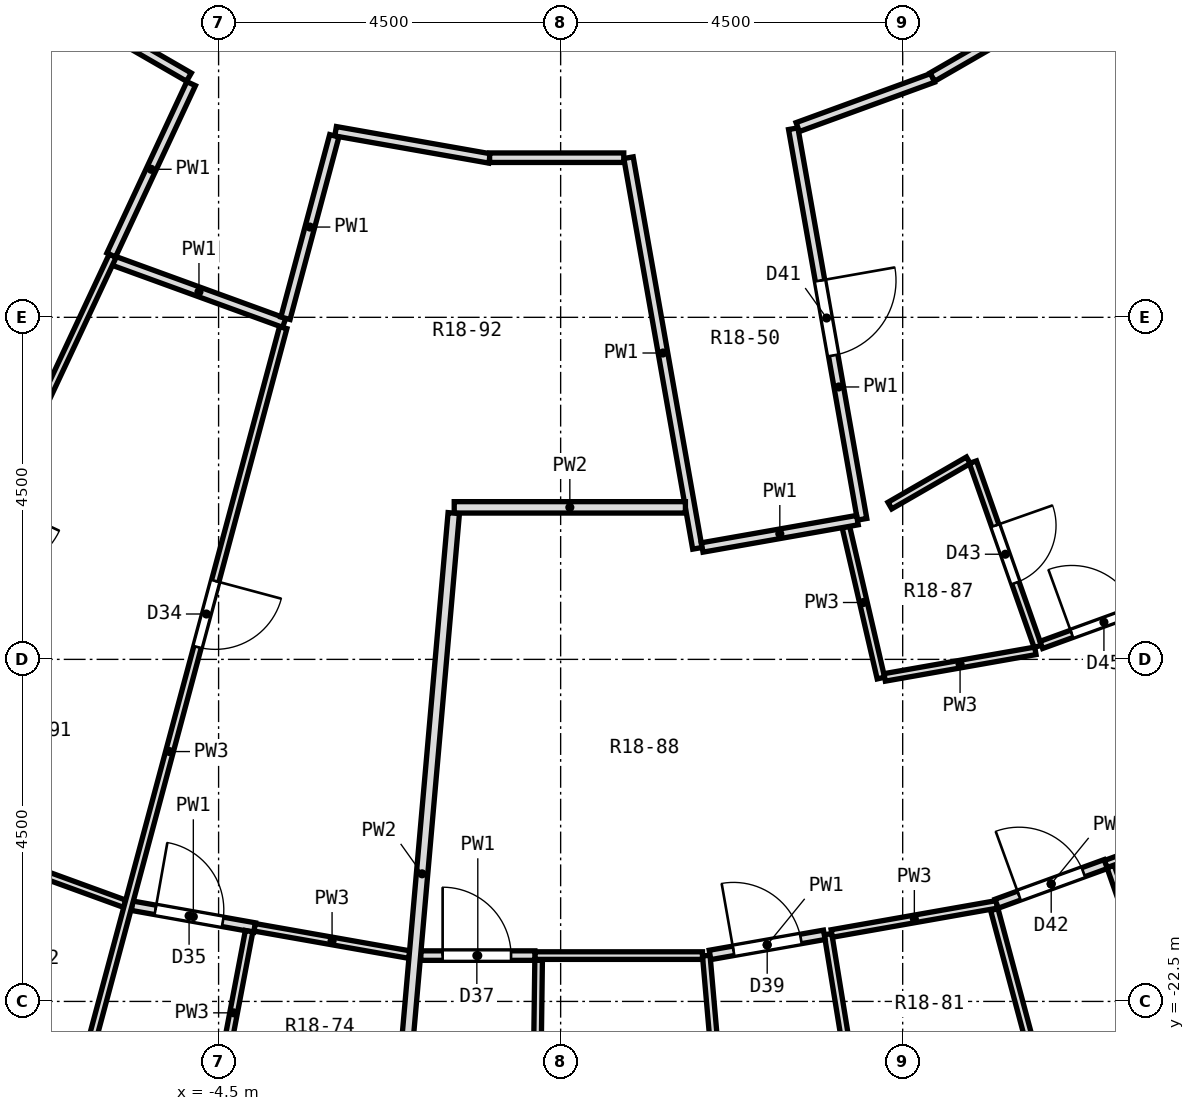
"""IFC4 building model, lengths in metres.
Left out: names, types, materials, properties, quantities, classifications, styles, units other than length and angle.
Written with IfcOpenShell. Run it as: python <this file> out.ifc"""

import sys

from ifc_helpers import new_model, si_unit, direction, frame, frame_2d, origin, place, context, subcontext, project, spatial, rectangle, extrude, element, fill, save


model = new_model("IFC4")
c1 = context("Model", 3, precision=1e-05, world=origin(), true_north=direction((0.0, 1.0)))
c2 = subcontext(c1, "Body", "Model", "MODEL_VIEW")
j1 = project(units=[si_unit("LENGTHUNIT", "METRE"), si_unit("PLANEANGLEUNIT", "RADIAN")], contexts=[c1])
p1 = place(None, origin())
s1 = spatial("IfcSite", under=j1, at=p1, CompositionType="ELEMENT")
p2 = place(p1, origin())
s2 = spatial("IfcBuilding", under=s1, at=p2, CompositionType="ELEMENT")
p3 = place(p2, frame((0.0, 0.0, 101.8)))
s3 = spatial("IfcBuildingStorey", under=s2, at=p3, CompositionType="ELEMENT", Elevation=101.8)
p4 = place(p3, frame((1.916, -21.897, 0.0), z_axis=(0.0, 0.0, 1.0), x_axis=(0.087069954148, -0.996202199899, 0.0)))
e1 = element("IfcWall", 1, at=p4, inside=s3, PredefinedType="PARTITIONING", context=c2, shape_type="SweptSolid", body=[
    extrude(rectangle(XDim=3.684, YDim=0.1, at=frame_2d((1.842, 0.0))), origin(), (0.0, 0.0, 1.0), 2.8),
])
p5 = place(p3, frame((3.518, -21.615, 0.0), z_axis=(0.0, 0.0, 1.0), x_axis=(0.160403826344, -0.987051474085, 0.0)))
e2 = element("IfcWall", 2, at=p5, inside=s3, PredefinedType="PARTITIONING", context=c2, shape_type="SweptSolid", body=[
    extrude(rectangle(XDim=2.3, YDim=0.1, at=frame_2d((1.15, 0.0))), origin(), (0.0, 0.0, 1.0), 2.8),
])
p6 = place(p3, frame((0.893, -11.4, 0.0), z_axis=(0.0, 0.0, 1.0), x_axis=(0.173617189854, -0.984813216497, 0.0)))
e3 = element("IfcWall", 3, at=p6, inside=s3, PredefinedType="PARTITIONING", context=c2, shape_type="SweptSolid", body=[
    extrude(rectangle(XDim=5.219, YDim=0.125, at=frame_2d((2.609, 0.0))), origin(), (0.0, 0.0, 1.0), 2.8),
])
p7 = place(p3, frame((3.06, -11.019, 0.0), z_axis=(0.0, 0.0, 1.0), x_axis=(0.173641190819, -0.984808984956, 0.0)))
e4 = element("IfcWall", 4, at=p7, inside=s3, PredefinedType="PARTITIONING", context=c2, shape_type="SweptSolid", body=[
    extrude(rectangle(XDim=5.218, YDim=0.125, at=frame_2d((2.609, 0.0))), origin(), (0.0, 0.0, 1.0), 2.8),
])
p8 = place(p7, frame((2.029, 0.0, 0.0)))
e5 = element("IfcOpeningElement", 5, at=p8, cuts=e4, PredefinedType="OPENING", context=c2, shape_type="SweptSolid", body=[
    extrude(rectangle(XDim=1.0, YDim=2.1, at=frame_2d((0.5, 1.05))), frame((0.0, 0.074, 0.0), z_axis=(0.0, -1.0, 0.0), x_axis=(1.0, 0.0, 0.0)), (0.0, 0.0, 1.0), 0.149),
])
p9 = place(p3, frame((3.753, -16.258, 0.0), z_axis=(0.0, 0.0, 1.0), x_axis=(0.22577693712, -0.974179025983, 0.0)))
e6 = element("IfcWall", 6, at=p9, inside=s3, PredefinedType="PARTITIONING", context=c2, shape_type="SweptSolid", body=[
    extrude(rectangle(XDim=2.041, YDim=0.1, at=frame_2d((1.02, 0.0))), origin(), (0.0, 0.0, 1.0), 2.8),
])
p10 = place(p3, frame((5.706, -21.292, 0.0), z_axis=(0.0, 0.0, 1.0), x_axis=(0.258396854417, -0.966038853063, 0.0)))
e7 = element("IfcWall", 7, at=p10, inside=s3, PredefinedType="PARTITIONING", context=c2, shape_type="SweptSolid", body=[
    extrude(rectangle(XDim=3.622, YDim=0.1, at=frame_2d((1.811, 0.0))), origin(), (0.0, 0.0, 1.0), 2.8),
])
p11 = place(p3, frame((7.234, -20.723, 0.0), z_axis=(0.0, 0.0, 1.0), x_axis=(0.329707399535, -0.944083169372, 0.0)))
e8 = element("IfcWall", 8, at=p11, inside=s3, PredefinedType="PARTITIONING", context=c2, shape_type="SweptSolid", body=[
    extrude(rectangle(XDim=2.25, YDim=0.1, at=frame_2d((1.125, 0.0))), origin(), (0.0, 0.0, 1.0), 2.8),
])
p12 = place(p3, frame((5.424, -15.405, 0.0), z_axis=(0.0, 0.0, 1.0), x_axis=(0.332059637914, -0.943258393479, 0.0)))
e9 = element("IfcWall", 9, at=p12, inside=s3, PredefinedType="PARTITIONING", context=c2, shape_type="SweptSolid", body=[
    extrude(rectangle(XDim=2.57, YDim=0.1, at=frame_2d((1.285, 0.0))), origin(), (0.0, 0.0, 1.0), 2.8),
])
p13 = place(p12, frame((0.885, 0.0, 0.0)))
e10 = element("IfcOpeningElement", 10, at=p13, cuts=e9, PredefinedType="OPENING", context=c2, shape_type="SweptSolid", body=[
    extrude(rectangle(XDim=0.8, YDim=2.1, at=frame_2d((0.4, 1.05))), frame((0.0, 0.062, 0.0), z_axis=(0.0, -1.0, 0.0), x_axis=(1.0, 0.0, 0.0)), (0.0, 0.0, 1.0), 0.124),
])
p14 = place(p3, frame((-6.421, -9.456, 0.0), z_axis=(0.0, 0.0, 1.0), x_axis=(0.866118896865, -0.499838030259, 0.0)))
e11 = element("IfcWall", 11, at=p14, inside=s3, PredefinedType="PARTITIONING", context=c2, shape_type="SweptSolid", body=[
    extrude(rectangle(XDim=1.768, YDim=0.125, at=frame_2d((0.884, 0.0))), origin(), (0.0, 0.0, 1.0), 2.8),
])
p15 = place(p3, frame((-8.576, -22.629, 0.0), z_axis=(0.0, 0.0, 1.0), x_axis=(0.939703758344, -0.341989541586, 0.0)))
e12 = element("IfcWall", 12, at=p15, inside=s3, PredefinedType="PARTITIONING", context=c2, shape_type="SweptSolid", body=[
    extrude(rectangle(XDim=2.386, YDim=0.1, at=frame_2d((1.193, 0.0))), origin(), (0.0, 0.0, 1.0), 2.8),
])
p16 = place(p15, frame((0.818, 0.0, 0.0)))
e13 = element("IfcOpeningElement", 13, at=p16, cuts=e12, PredefinedType="OPENING", context=c2, shape_type="SweptSolid", body=[
    extrude(rectangle(XDim=0.8, YDim=2.1, at=frame_2d((0.4, 1.05))), frame((0.0, 0.062, 0.0), z_axis=(0.0, -1.0, 0.0), x_axis=(1.0, 0.0, 0.0)), (0.0, 0.0, 1.0), 0.124),
])
p17 = place(p3, frame((-7.808, -20.461, 0.0), z_axis=(0.0, 0.0, 1.0), x_axis=(0.939728749343, -0.341920864613, 0.0)))
e14 = element("IfcWall", 14, at=p17, inside=s3, PredefinedType="PARTITIONING", context=c2, shape_type="SweptSolid", body=[
    extrude(rectangle(XDim=2.205, YDim=0.1, at=frame_2d((1.103, 0.0))), origin(), (0.0, 0.0, 1.0), 2.8),
])
p18 = place(p3, frame((-5.879, -12.756, 0.0), z_axis=(0.0, 0.0, 1.0), x_axis=(0.939637973706, -0.342170247639, 0.0)))
e15 = element("IfcWall", 15, at=p18, inside=s3, PredefinedType="PARTITIONING", context=c2, shape_type="SweptSolid", body=[
    extrude(rectangle(XDim=2.386, YDim=0.125, at=frame_2d((1.193, 0.0))), origin(), (0.0, 0.0, 1.0), 2.8),
])
p19 = place(p3, frame((-5.64, -21.241, 0.0), z_axis=(0.0, 0.0, 1.0), x_axis=(0.984569921273, -0.174991628724, 0.0)))
e16 = element("IfcWall", 16, at=p19, inside=s3, PredefinedType="PARTITIONING", context=c2, shape_type="SweptSolid", body=[
    extrude(rectangle(XDim=1.639, YDim=0.125, at=frame_2d((0.82, 0.0))), origin(), (0.0, 0.0, 1.0), 2.8),
])
p20 = place(p19, frame((0.313, 0.0, 0.0)))
e17 = element("IfcOpeningElement", 17, at=p20, cuts=e16, PredefinedType="OPENING", context=c2, shape_type="SweptSolid", body=[
    extrude(rectangle(XDim=0.9, YDim=2.1, at=frame_2d((0.45, 1.05))), frame((0.0, 0.074, 0.0), z_axis=(0.0, -1.0, 0.0), x_axis=(1.0, 0.0, 0.0)), (0.0, 0.0, 1.0), 0.149),
])
p21 = place(p3, frame((-4.025, -21.525, 0.0), z_axis=(0.0, 0.0, 1.0), x_axis=(0.984791880798, -0.173738169424, 0.0)))
e18 = element("IfcWall", 18, at=p21, inside=s3, PredefinedType="PARTITIONING", context=c2, shape_type="SweptSolid", body=[
    extrude(rectangle(XDim=2.067, YDim=0.1, at=frame_2d((1.034, 0.0))), origin(), (0.0, 0.0, 1.0), 2.8),
])
p22 = place(p3, frame((-2.961, -11.052, 0.0), z_axis=(0.0, 0.0, 1.0), x_axis=(0.984777586027, -0.173819176329, 0.0)))
e19 = element("IfcWall", 19, at=p22, inside=s3, PredefinedType="PARTITIONING", context=c2, shape_type="SweptSolid", body=[
    extrude(rectangle(XDim=2.058, YDim=0.125, at=frame_2d((1.029, 0.0))), origin(), (0.0, 0.0, 1.0), 2.8),
])
p23 = place(p3, frame((-0.339, -21.897, 0.0), z_axis=(0.0, 0.0, 1.0), x_axis=(1.0, 0.0, 0.0)))
e20 = element("IfcWall", 20, at=p23, inside=s3, PredefinedType="PARTITIONING", context=c2, shape_type="SweptSolid", body=[
    extrude(rectangle(XDim=2.205, YDim=0.1, at=frame_2d((1.103, 0.0))), origin(), (0.0, 0.0, 1.0), 2.8),
])
p24 = place(p3, frame((-1.841, -21.897, 0.0), z_axis=(0.0, 0.0, 1.0), x_axis=(1.0, 0.0, 0.0)))
e21 = element("IfcWall", 21, at=p24, inside=s3, PredefinedType="PARTITIONING", context=c2, shape_type="SweptSolid", body=[
    extrude(rectangle(XDim=1.502, YDim=0.125, at=frame_2d((0.751, 0.0))), origin(), (0.0, 0.0, 1.0), 2.8),
])
p25 = place(p24, frame((0.289, 0.0, 0.0)))
e22 = element("IfcOpeningElement", 22, at=p25, cuts=e21, PredefinedType="OPENING", context=c2, shape_type="SweptSolid", body=[
    extrude(rectangle(XDim=0.9, YDim=2.1, at=frame_2d((0.45, 1.05))), frame((0.0, 0.074, 0.0), z_axis=(0.0, -1.0, 0.0), x_axis=(1.0, 0.0, 0.0)), (0.0, 0.0, 1.0), 0.149),
])
p26 = place(p3, frame((-1.4, -16.0, 0.0), z_axis=(0.0, 0.0, 1.0), x_axis=(1.0, 0.0, 0.0)))
e23 = element("IfcWall", 23, at=p26, inside=s3, PredefinedType="PARTITIONING", context=c2, shape_type="SweptSolid", body=[
    extrude(rectangle(XDim=3.042, YDim=0.15, at=frame_2d((1.521, 0.0))), origin(), (0.0, 0.0, 1.0), 2.8),
])
p27 = place(p3, frame((-0.935, -11.4, 0.0), z_axis=(0.0, 0.0, 1.0), x_axis=(1.0, 0.0, 0.0)))
e24 = element("IfcWall", 24, at=p27, inside=s3, PredefinedType="PARTITIONING", context=c2, shape_type="SweptSolid", body=[
    extrude(rectangle(XDim=1.765, YDim=0.125, at=frame_2d((0.883, 0.0))), origin(), (0.0, 0.0, 1.0), 2.8),
])
p28 = place(p3, frame((3.567, -21.606, 0.0), z_axis=(0.0, 0.0, 1.0), x_axis=(0.984800270927, 0.173690605338, 0.0)))
e25 = element("IfcWall", 25, at=p28, inside=s3, PredefinedType="PARTITIONING", context=c2, shape_type="SweptSolid", body=[
    extrude(rectangle(XDim=2.205, YDim=0.1, at=frame_2d((1.103, 0.0))), origin(), (0.0, 0.0, 1.0), 2.8),
])
p29 = place(p3, frame((1.965, -21.888, 0.0), z_axis=(0.0, 0.0, 1.0), x_axis=(0.984857531579, 0.173365632386, 0.0)))
e26 = element("IfcWall", 26, at=p29, inside=s3, PredefinedType="PARTITIONING", context=c2, shape_type="SweptSolid", body=[
    extrude(rectangle(XDim=1.527, YDim=0.125, at=frame_2d((0.763, 0.0))), origin(), (0.0, 0.0, 1.0), 2.8),
])
p30 = place(p29, frame((0.314, 0.0, 0.0)))
e27 = element("IfcOpeningElement", 27, at=p30, cuts=e26, PredefinedType="OPENING", context=c2, shape_type="SweptSolid", body=[
    extrude(rectangle(XDim=0.9, YDim=2.1, at=frame_2d((0.45, 1.05))), frame((0.0, 0.074, 0.0), z_axis=(0.0, -1.0, 0.0), x_axis=(1.0, 0.0, 0.0)), (0.0, 0.0, 1.0), 0.149),
])
p31 = place(p3, frame((4.263, -18.237, 0.0), z_axis=(0.0, 0.0, 1.0), x_axis=(0.984827477251, 0.173536278777, 0.0)))
e28 = element("IfcWall", 28, at=p31, inside=s3, PredefinedType="PARTITIONING", context=c2, shape_type="SweptSolid", body=[
    extrude(rectangle(XDim=2.013, YDim=0.1, at=frame_2d((1.007, 0.0))), origin(), (0.0, 0.0, 1.0), 2.8),
])
p32 = place(p3, frame((1.862, -16.528, 0.0), z_axis=(0.0, 0.0, 1.0), x_axis=(0.984827380623, 0.173536827142, 0.0)))
e29 = element("IfcWall", 29, at=p32, inside=s3, PredefinedType="PARTITIONING", context=c2, shape_type="SweptSolid", body=[
    extrude(rectangle(XDim=2.074, YDim=0.125, at=frame_2d((1.037, 0.0))), origin(), (0.0, 0.0, 1.0), 2.8),
])
p33 = place(p3, frame((7.171, -20.693, 0.0), z_axis=(0.0, 0.0, 1.0), x_axis=(0.939573404597, 0.342347509665, 0.0)))
e30 = element("IfcWall", 30, at=p33, inside=s3, PredefinedType="PARTITIONING", context=c2, shape_type="SweptSolid", body=[
    extrude(rectangle(XDim=2.205, YDim=0.1, at=frame_2d((1.103, 0.0))), origin(), (0.0, 0.0, 1.0), 2.8),
])
p34 = place(p3, frame((5.736, -21.215, 0.0), z_axis=(0.0, 0.0, 1.0), x_axis=(0.939798092341, 0.34173022347, 0.0)))
e31 = element("IfcWall", 31, at=p34, inside=s3, PredefinedType="PARTITIONING", context=c2, shape_type="SweptSolid", body=[
    extrude(rectangle(XDim=1.527, YDim=0.125, at=frame_2d((0.763, 0.0))), origin(), (0.0, 0.0, 1.0), 2.8),
])
p35 = place(p34, frame((0.314, 0.0, 0.0)))
e32 = element("IfcOpeningElement", 32, at=p35, cuts=e31, PredefinedType="OPENING", context=c2, shape_type="SweptSolid", body=[
    extrude(rectangle(XDim=0.9, YDim=2.1, at=frame_2d((0.45, 1.05))), frame((0.0, 0.074, 0.0), z_axis=(0.0, -1.0, 0.0), x_axis=(1.0, 0.0, 0.0)), (0.0, 0.0, 1.0), 0.149),
])
p36 = place(p3, frame((6.324, -17.81, 0.0), z_axis=(0.0, 0.0, 1.0), x_axis=(0.939842226204, 0.341608825771, 0.0)))
e33 = element("IfcWall", 33, at=p36, inside=s3, PredefinedType="PARTITIONING", context=c2, shape_type="SweptSolid", body=[
    extrude(rectangle(XDim=1.752, YDim=0.1, at=frame_2d((0.876, 0.0))), origin(), (0.0, 0.0, 1.0), 2.8),
])
p37 = place(p36, frame((0.426, 0.0, 0.0)))
e34 = element("IfcOpeningElement", 34, at=p37, cuts=e33, PredefinedType="OPENING", context=c2, shape_type="SweptSolid", body=[
    extrude(rectangle(XDim=0.9, YDim=2.1, at=frame_2d((0.45, 1.05))), frame((0.0, 0.062, 0.0), z_axis=(0.0, -1.0, 0.0), x_axis=(1.0, 0.0, 0.0)), (0.0, 0.0, 1.0), 0.124),
])
p38 = place(p3, frame((3.119, -10.997, 0.0), z_axis=(0.0, 0.0, 1.0), x_axis=(0.939510386217, 0.342520414269, 0.0)))
e35 = element("IfcWall", 35, at=p38, inside=s3, PredefinedType="PARTITIONING", context=c2, shape_type="SweptSolid", body=[
    extrude(rectangle(XDim=1.891, YDim=0.125, at=frame_2d((0.946, 0.0))), origin(), (0.0, 0.0, 1.0), 2.8),
])
p39 = place(p3, frame((4.331, -15.977, 0.0), z_axis=(0.0, 0.0, 1.0), x_axis=(0.86607987314, 0.499905644439, 0.0)))
e36 = element("IfcWall", 36, at=p39, inside=s3, PredefinedType="PARTITIONING", context=c2, shape_type="SweptSolid", body=[
    extrude(rectangle(XDim=1.192, YDim=0.1, at=frame_2d((0.596, 0.0))), origin(), (0.0, 0.0, 1.0), 2.8),
])
p40 = place(p3, frame((4.89, -10.34, 0.0), z_axis=(0.0, 0.0, 1.0), x_axis=(0.866142818645, 0.499796576329, 0.0)))
e37 = element("IfcWall", 37, at=p40, inside=s3, PredefinedType="PARTITIONING", context=c2, shape_type="SweptSolid", body=[
    extrude(rectangle(XDim=1.996, YDim=0.125, at=frame_2d((0.998, 0.0))), origin(), (0.0, 0.0, 1.0), 2.8),
])
p41 = place(p3, frame((-9.788, -13.375, 0.0), z_axis=(0.0, 0.0, 1.0), x_axis=(0.643234807085, 0.765668977401, 0.0)))
e38 = element("IfcWall", 38, at=p41, inside=s3, PredefinedType="PARTITIONING", context=c2, shape_type="SweptSolid", body=[
    extrude(rectangle(XDim=5.093, YDim=0.125, at=frame_2d((2.546, 0.0))), origin(), (0.0, 0.0, 1.0), 2.8),
])
p42 = place(p41, frame((2.32, 0.0, 0.0)))
e39 = element("IfcOpeningElement", 39, at=p42, cuts=e38, PredefinedType="OPENING", context=c2, shape_type="SweptSolid", body=[
    extrude(rectangle(XDim=1.0, YDim=2.1, at=frame_2d((0.5, 1.05))), frame((0.0, 0.074, 0.0), z_axis=(0.0, -1.0, 0.0), x_axis=(1.0, 0.0, 0.0)), (0.0, 0.0, 1.0), 0.149),
])
p43 = place(p3, frame((-10.845, -23.261, 0.0), z_axis=(0.0, 0.0, 1.0), x_axis=(0.424206154739, 0.905565645484, 0.0)))
e40 = element("IfcWall", 40, at=p43, inside=s3, PredefinedType="PARTITIONING", context=c2, shape_type="SweptSolid", body=[
    extrude(rectangle(XDim=11.675, YDim=0.1, at=frame_2d((5.837, 0.0))), origin(), (0.0, 0.0, 1.0), 2.8),
])
p44 = place(p43, frame((7.199, 0.0, 0.0)))
e41 = element("IfcOpeningElement", 41, at=p44, cuts=e40, PredefinedType="OPENING", context=c2, shape_type="SweptSolid", body=[
    extrude(rectangle(XDim=0.9, YDim=2.1, at=frame_2d((0.45, 1.05))), frame((0.0, 0.062, 0.0), z_axis=(0.0, -1.0, 0.0), x_axis=(1.0, 0.0, 0.0)), (0.0, 0.0, 1.0), 0.124),
])
p45 = place(p3, frame((-5.913, -12.68, 0.0), z_axis=(0.0, 0.0, 1.0), x_axis=(0.422627539676, 0.906303460606, 0.0)))
e42 = element("IfcWall", 42, at=p45, inside=s3, PredefinedType="PARTITIONING", context=c2, shape_type="SweptSolid", body=[
    extrude(rectangle(XDim=2.488, YDim=0.125, at=frame_2d((1.244, 0.0))), origin(), (0.0, 0.0, 1.0), 2.8),
])
p46 = place(p3, frame((-6.642, -24.791, 0.0), z_axis=(0.0, 0.0, 1.0), x_axis=(0.259103074619, 0.965849676049, 0.0)))
e43 = element("IfcWall", 43, at=p46, inside=s3, PredefinedType="PARTITIONING", context=c2, shape_type="SweptSolid", body=[
    extrude(rectangle(XDim=11.549, YDim=0.1, at=frame_2d((5.774, 0.0))), origin(), (0.0, 0.0, 1.0), 2.8),
])
p47 = place(p46, frame((7.199, 0.0, 0.0)))
e44 = element("IfcOpeningElement", 44, at=p47, cuts=e43, PredefinedType="OPENING", context=c2, shape_type="SweptSolid", body=[
    extrude(rectangle(XDim=0.9, YDim=2.1, at=frame_2d((0.45, 1.05))), frame((0.0, 0.062, 0.0), z_axis=(0.0, -1.0, 0.0), x_axis=(1.0, 0.0, 0.0)), (0.0, 0.0, 1.0), 0.124),
])
p48 = place(p3, frame((-3.62, -13.512, 0.0), z_axis=(0.0, 0.0, 1.0), x_axis=(0.258641119931, 0.965973483632, 0.0)))
e45 = element("IfcWall", 45, at=p48, inside=s3, PredefinedType="PARTITIONING", context=c2, shape_type="SweptSolid", body=[
    extrude(rectangle(XDim=2.484, YDim=0.125, at=frame_2d((1.242, 0.0))), origin(), (0.0, 0.0, 1.0), 2.8),
])
p49 = place(p3, frame((-4.507, -23.725, 0.0), z_axis=(0.0, 0.0, 1.0), x_axis=(0.186471082638, 0.982460449759, 0.0)))
e46 = element("IfcWall", 46, at=p49, inside=s3, PredefinedType="PARTITIONING", context=c2, shape_type="SweptSolid", body=[
    extrude(rectangle(XDim=2.188, YDim=0.1, at=frame_2d((1.094, 0.0))), origin(), (0.0, 0.0, 1.0), 2.8),
])
p50 = place(p3, frame((-2.24, -25.567, 0.0), z_axis=(0.0, 0.0, 1.0), x_axis=(0.087555048891, 0.996159682688, 0.0)))
e47 = element("IfcWall", 47, at=p50, inside=s3, PredefinedType="PARTITIONING", context=c2, shape_type="SweptSolid", body=[
    extrude(rectangle(XDim=9.528, YDim=0.15, at=frame_2d((4.764, 0.0))), origin(), (0.0, 0.0, 1.0), 2.8),
])
p51 = place(p3, frame((-0.318, -24.147, 0.0), z_axis=(0.0, 0.0, 1.0), x_axis=(0.013056922579, 0.999914754753, 0.0)))
e48 = element("IfcWall", 48, at=p51, inside=s3, PredefinedType="PARTITIONING", context=c2, shape_type="SweptSolid", body=[
    extrude(rectangle(XDim=2.188, YDim=0.1, at=frame_2d((1.094, 0.0))), origin(), (0.0, 0.0, 1.0), 2.8),
])
p52 = place(p47, frame((0.9, 0.0, 0.0), z_axis=(0.0, 0.0, 1.0), x_axis=(-1.0, 0.0, 0.0)))
e49 = element("IfcDoor", 49, at=p52, inside=s3, OperationType="SINGLE_SWING_LEFT", PredefinedType="DOOR", context=c2, shape_type="SweptSolid", body=[
    extrude(rectangle(XDim=0.9, YDim=2.1, at=frame_2d((0.45, 1.05))), frame((0.0, 0.025, 0.0), z_axis=(0.0, -1.0, 0.0), x_axis=(1.0, 0.0, 0.0)), (0.0, 0.0, 1.0), 0.05),
])
fill(e44, e49)
p53 = place(p20, origin())
e50 = element("IfcDoor", 50, at=p53, inside=s3, OperationType="SINGLE_SWING_LEFT", PredefinedType="DOOR", context=c2, shape_type="SweptSolid", body=[
    extrude(rectangle(XDim=0.9, YDim=2.1, at=frame_2d((0.45, 1.05))), frame((0.0, 0.025, 0.0), z_axis=(0.0, -1.0, 0.0), x_axis=(1.0, 0.0, 0.0)), (0.0, 0.0, 1.0), 0.05),
])
fill(e17, e50)
p54 = place(p25, origin())
e51 = element("IfcDoor", 51, at=p54, inside=s3, OperationType="SINGLE_SWING_LEFT", PredefinedType="DOOR", context=c2, shape_type="SweptSolid", body=[
    extrude(rectangle(XDim=0.9, YDim=2.1, at=frame_2d((0.45, 1.05))), frame((0.0, 0.025, 0.0), z_axis=(0.0, -1.0, 0.0), x_axis=(1.0, 0.0, 0.0)), (0.0, 0.0, 1.0), 0.05),
])
fill(e22, e51)
p55 = place(p30, origin())
e52 = element("IfcDoor", 52, at=p55, inside=s3, OperationType="SINGLE_SWING_LEFT", PredefinedType="DOOR", context=c2, shape_type="SweptSolid", body=[
    extrude(rectangle(XDim=0.9, YDim=2.1, at=frame_2d((0.45, 1.05))), frame((0.0, 0.025, 0.0), z_axis=(0.0, -1.0, 0.0), x_axis=(1.0, 0.0, 0.0)), (0.0, 0.0, 1.0), 0.05),
])
fill(e27, e52)
p56 = place(p8, origin())
e53 = element("IfcDoor", 53, at=p56, inside=s3, OperationType="SINGLE_SWING_LEFT", PredefinedType="DOOR", context=c2, shape_type="SweptSolid", body=[
    extrude(rectangle(XDim=1.0, YDim=2.1, at=frame_2d((0.5, 1.05))), frame((0.0, 0.025, 0.0), z_axis=(0.0, -1.0, 0.0), x_axis=(1.0, 0.0, 0.0)), (0.0, 0.0, 1.0), 0.05),
])
fill(e5, e53)
p57 = place(p35, origin())
e54 = element("IfcDoor", 54, at=p57, inside=s3, OperationType="SINGLE_SWING_LEFT", PredefinedType="DOOR", context=c2, shape_type="SweptSolid", body=[
    extrude(rectangle(XDim=0.9, YDim=2.1, at=frame_2d((0.45, 1.05))), frame((0.0, 0.025, 0.0), z_axis=(0.0, -1.0, 0.0), x_axis=(1.0, 0.0, 0.0)), (0.0, 0.0, 1.0), 0.05),
])
fill(e32, e54)
p58 = place(p13, origin())
e55 = element("IfcDoor", 55, at=p58, inside=s3, OperationType="SINGLE_SWING_LEFT", PredefinedType="DOOR", context=c2, shape_type="SweptSolid", body=[
    extrude(rectangle(XDim=0.8, YDim=2.1, at=frame_2d((0.4, 1.05))), frame((0.0, 0.025, 0.0), z_axis=(0.0, -1.0, 0.0), x_axis=(1.0, 0.0, 0.0)), (0.0, 0.0, 1.0), 0.05),
])
fill(e10, e55)
p59 = place(p37, origin())
e56 = element("IfcDoor", 56, at=p59, inside=s3, OperationType="SINGLE_SWING_LEFT", PredefinedType="DOOR", context=c2, shape_type="SweptSolid", body=[
    extrude(rectangle(XDim=0.9, YDim=2.1, at=frame_2d((0.45, 1.05))), frame((0.0, 0.025, 0.0), z_axis=(0.0, -1.0, 0.0), x_axis=(1.0, 0.0, 0.0)), (0.0, 0.0, 1.0), 0.05),
])
fill(e34, e56)
save(model, sys.argv[1])
